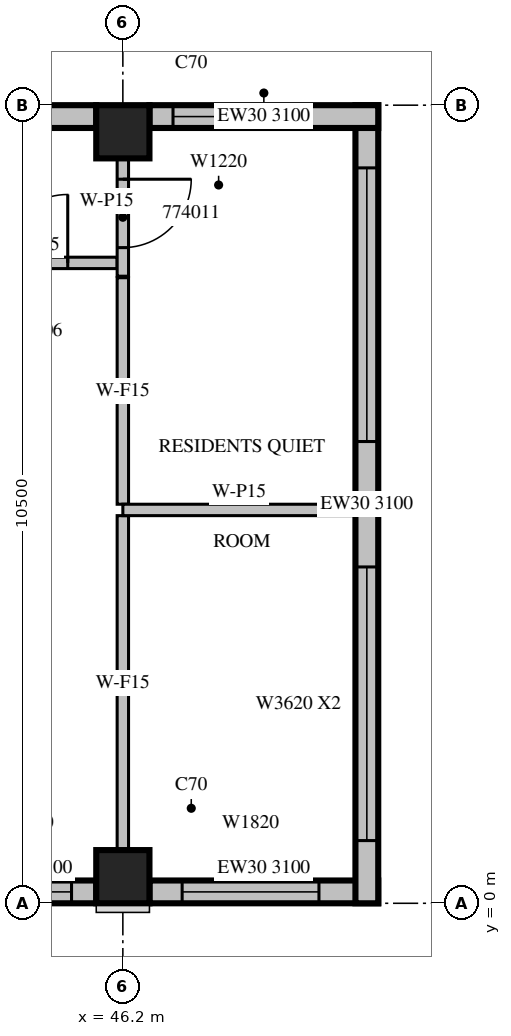
"""IFC4 building model, lengths in metres.
Left out: names, types, materials, properties, quantities, classifications, styles, units other than length and angle.
Written with IfcOpenShell. Run it as: python <this file> out.ifc"""

import sys

from ifc_helpers import new_model, si_unit, direction, frame, frame_2d, origin, origin_2d, place, context, subcontext, project, spatial, rectangle, extrude, source, transform, mapped, element, fill, save


model = new_model("IFC4")
c1 = context("Model", 3, precision=1e-05, world=origin(), true_north=direction((0.0, 1.0)))
c2 = subcontext(c1, "Body", "Model", "MODEL_VIEW")
j1 = project(units=[si_unit("LENGTHUNIT", "METRE"), si_unit("PLANEANGLEUNIT", "RADIAN")], contexts=[c1])
p1 = place(None, origin())
s1 = spatial("IfcSite", under=j1, at=p1, CompositionType="ELEMENT")
p2 = place(p1, origin())
s2 = spatial("IfcBuilding", under=s1, at=p2, CompositionType="ELEMENT")
p3 = place(p2, frame((0.0, 0.0, 319.5)))
s3 = spatial("IfcBuildingStorey", under=s2, at=p3, CompositionType="ELEMENT", Elevation=319.5)
m1 = source(origin(), c2, "Body", "SweptSolid", [
    extrude(rectangle(XDim=0.7, YDim=0.7, at=origin_2d()), origin(), (0.0, 0.0, 1.0), 3.5),
])
for number, where, z_axis, x_axis in (
    (1, (46.2, 0.35, 0.0), (0.0, 0.0, 1.0), (1.0, 0.0, 0.0)),
    (2, (46.2, 10.15, 0.0), (0.0, 0.0, 1.0), (1.0, 0.0, 0.0)),
):
    element("IfcColumn", number, at=place(p3, frame(where, z_axis=z_axis, x_axis=x_axis)), inside=s3, PredefinedType="COLUMN", context=c2, shape_type="MappedRepresentation", body=[
        mapped(m1, transform((0.0, 0.0, 0.0), scale=1.0)),
    ])
m2 = source(origin(), c2, "Body", "SweptSolid", [
    extrude(rectangle(XDim=1.85, YDim=0.3, at=frame_2d((0.925, 0.0))), origin(), (0.0, 0.0, 1.0), 3.1),
])
p4 = place(p3, frame((44.0, 0.15, 0.0), z_axis=(0.0, 0.0, 1.0), x_axis=(1.0, 0.0, 0.0)))
e3 = element("IfcWall", 3, at=p4, inside=s3, PredefinedType="STANDARD", context=c2, shape_type="MappedRepresentation", body=[
    mapped(m2, transform((0.0, 0.0, 0.0), scale=1.0)),
])
m3 = source(origin(), c2, "Body", "SweptSolid", [
    extrude(rectangle(XDim=1.2, YDim=2.0, at=frame_2d((0.6, 1.0))), frame((0.0, 0.16, 0.0), z_axis=(0.0, -1.0, 0.0), x_axis=(1.0, 0.0, 0.0)), (0.0, 0.0, 1.0), 0.32),
])
p5 = place(p4, frame((0.325, 0.0, 0.6)))
e4 = element("IfcOpeningElement", 4, at=p5, cuts=e3, PredefinedType="OPENING", context=c2, shape_type="MappedRepresentation", body=[
    mapped(m3, transform((0.0, 0.0, 0.0), scale=1.0)),
])
m4 = source(origin(), c2, "Body", "SweptSolid", [
    extrude(rectangle(XDim=3.01, YDim=0.3, at=frame_2d((1.505, 0.0))), origin(), (0.0, 0.0, 1.0), 3.1),
])
p6 = place(p3, frame((46.55, 0.15, 0.0), z_axis=(0.0, 0.0, 1.0), x_axis=(1.0, 0.0, 0.0)))
e5 = element("IfcWall", 5, at=p6, inside=s3, PredefinedType="STANDARD", context=c2, shape_type="MappedRepresentation", body=[
    mapped(m4, transform((0.0, 0.0, 0.0), scale=1.0)),
])
m5 = source(origin(), c2, "Body", "SweptSolid", [
    extrude(rectangle(XDim=1.8, YDim=2.0, at=frame_2d((0.9, 1.0))), frame((0.0, 0.16, 0.0), z_axis=(0.0, -1.0, 0.0), x_axis=(1.0, 0.0, 0.0)), (0.0, 0.0, 1.0), 0.32),
])
p7 = place(p6, frame((0.43, 0.0, 0.6)))
e6 = element("IfcOpeningElement", 6, at=p7, cuts=e5, PredefinedType="OPENING", context=c2, shape_type="MappedRepresentation", body=[
    mapped(m5, transform((0.0, 0.0, 0.0), scale=1.0)),
])
m6 = source(origin(), c2, "Body", "SweptSolid", [
    extrude(rectangle(XDim=10.5, YDim=0.3, at=frame_2d((5.25, 0.0))), origin(), (0.0, 0.0, 1.0), 3.1),
])
p8 = place(p3, frame((49.41, 0.0, 0.0), z_axis=(0.0, 0.0, 1.0), x_axis=(0.0, 1.0, 0.0)))
e7 = element("IfcWall", 7, at=p8, inside=s3, PredefinedType="STANDARD", context=c2, shape_type="MappedRepresentation", body=[
    mapped(m6, transform((0.0, 0.0, 0.0), scale=1.0)),
])
m7 = source(origin(), c2, "Body", "SweptSolid", [
    extrude(rectangle(XDim=3.6, YDim=2.0, at=frame_2d((1.8, 1.0))), frame((0.0, 0.16, 0.0), z_axis=(0.0, -1.0, 0.0), x_axis=(1.0, 0.0, 0.0)), (0.0, 0.0, 1.0), 0.32),
])
p9 = place(p8, frame((0.825, 0.0, 0.6)))
e8 = element("IfcOpeningElement", 8, at=p9, cuts=e7, PredefinedType="OPENING", context=c2, shape_type="MappedRepresentation", body=[
    mapped(m7, transform((0.0, 0.0, 0.0), scale=1.0)),
])
p10 = place(p8, frame((6.075, 0.0, 0.6)))
e9 = element("IfcOpeningElement", 9, at=p10, cuts=e7, PredefinedType="OPENING", context=c2, shape_type="MappedRepresentation", body=[
    mapped(m7, transform((0.0, 0.0, 0.0), scale=1.0)),
])
p11 = place(p3, frame((49.56, 10.35, 0.0), z_axis=(0.0, 0.0, 1.0), x_axis=(-1.0, 0.0, 0.0)))
e10 = element("IfcWall", 10, at=p11, inside=s3, PredefinedType="STANDARD", context=c2, shape_type="MappedRepresentation", body=[
    mapped(m4, transform((0.0, 0.0, 0.0), scale=1.0)),
])
p12 = place(p11, frame((1.5, 0.0, 0.6)))
e11 = element("IfcOpeningElement", 11, at=p12, cuts=e10, PredefinedType="OPENING", context=c2, shape_type="MappedRepresentation", body=[
    mapped(m3, transform((0.0, 0.0, 0.0), scale=1.0)),
])
m8 = source(origin(), c2, "Body", "SweptSolid", [
    extrude(rectangle(XDim=7.7, YDim=0.3, at=frame_2d((3.85, 0.0))), origin(), (0.0, 0.0, 1.0), 3.1),
])
p13 = place(p3, frame((45.85, 10.35, 0.0), z_axis=(0.0, 0.0, 1.0), x_axis=(-1.0, 0.0, 0.0)))
e12 = element("IfcWall", 12, at=p13, inside=s3, PredefinedType="STANDARD", context=c2, shape_type="MappedRepresentation", body=[
    mapped(m8, transform((0.0, 0.0, 0.0), scale=1.0)),
])
m9 = source(origin(), c2, "Body", "SweptSolid", [
    extrude(rectangle(XDim=3.0, YDim=2.0, at=frame_2d((1.5, 1.0))), frame((0.0, 0.16, 0.0), z_axis=(0.0, -1.0, 0.0), x_axis=(1.0, 0.0, 0.0)), (0.0, 0.0, 1.0), 0.32),
])
p14 = place(p13, frame((1.09, 0.0, 0.6)))
e13 = element("IfcOpeningElement", 13, at=p14, cuts=e12, PredefinedType="OPENING", context=c2, shape_type="MappedRepresentation", body=[
    mapped(m9, transform((0.0, 0.0, 0.0), scale=1.0)),
])
p15 = place(p13, frame((6.19, 0.0, 0.6)))
e14 = element("IfcOpeningElement", 14, at=p15, cuts=e12, PredefinedType="OPENING", context=c2, shape_type="MappedRepresentation", body=[
    mapped(m3, transform((0.0, 0.0, 0.0), scale=1.0)),
])
m10 = source(origin(), c2, "Body", "SweptSolid", [
    extrude(rectangle(XDim=2.2, YDim=0.15, at=frame_2d((1.1, 0.0))), origin(), (0.0, 0.0, 1.0), 3.1),
])
p16 = place(p3, frame((46.125, 8.425, 0.0), z_axis=(0.0, 0.0, 1.0), x_axis=(-1.0, 0.0, 0.0)))
e15 = element("IfcWall", 15, at=p16, inside=s3, PredefinedType="PARTITIONING", context=c2, shape_type="MappedRepresentation", body=[
    mapped(m10, transform((0.0, 0.0, 0.0), scale=1.0)),
])
m11 = source(origin(), c2, "Body", "SweptSolid", [
    extrude(rectangle(XDim=0.9, YDim=2.1, at=frame_2d((0.45, 1.05))), frame((0.0, 0.085, 0.0), z_axis=(0.0, -1.0, 0.0), x_axis=(1.0, 0.0, 0.0)), (0.0, 0.0, 1.0), 0.17),
])
p17 = place(p16, frame((0.65, 0.0, 0.0)))
e16 = element("IfcOpeningElement", 16, at=p17, cuts=e15, PredefinedType="OPENING", context=c2, shape_type="MappedRepresentation", body=[
    mapped(m11, transform((0.0, 0.0, 0.0), scale=1.0)),
])
m12 = source(origin(), c2, "Body", "SweptSolid", [
    extrude(rectangle(XDim=1.551, YDim=0.15, at=frame_2d((0.775, 0.0))), origin(), (0.0, 0.0, 1.0), 3.1),
])
p18 = place(p3, frame((46.2, 9.801, 0.0), z_axis=(0.0, 0.0, 1.0), x_axis=(0.0, -1.0, 0.0)))
e17 = element("IfcWall", 17, at=p18, inside=s3, PredefinedType="PARTITIONING", context=c2, shape_type="MappedRepresentation", body=[
    mapped(m12, transform((0.0, 0.0, 0.0), scale=1.0)),
])
p19 = place(p18, frame((0.275, 0.0, 0.0)))
e18 = element("IfcOpeningElement", 18, at=p19, cuts=e17, PredefinedType="OPENING", context=c2, shape_type="MappedRepresentation", body=[
    mapped(m11, transform((0.0, 0.0, 0.0), scale=1.0)),
])
m13 = source(origin(), c2, "Body", "SweptSolid", [
    extrude(rectangle(XDim=4.401, YDim=0.15, at=frame_2d((2.2, 0.0))), origin(), (0.0, 0.0, 1.0), 3.1),
])
p20 = place(p3, frame((46.2, 0.699, 0.0), z_axis=(0.0, 0.0, 1.0), x_axis=(0.0, 1.0, 0.0)))
e19 = element("IfcWall", 19, at=p20, inside=s3, PredefinedType="PARTITIONING", context=c2, shape_type="MappedRepresentation", body=[
    mapped(m13, transform((0.0, 0.0, 0.0), scale=1.0)),
])
m14 = source(origin(), c2, "Body", "SweptSolid", [
    extrude(rectangle(XDim=2.98, YDim=0.15, at=frame_2d((1.49, 0.0))), origin(), (0.0, 0.0, 1.0), 3.1),
])
p21 = place(p3, frame((46.2, 5.25, 0.0), z_axis=(0.0, 0.0, 1.0), x_axis=(0.0, 1.0, 0.0)))
e20 = element("IfcWall", 20, at=p21, inside=s3, PredefinedType="PARTITIONING", context=c2, shape_type="MappedRepresentation", body=[
    mapped(m14, transform((0.0, 0.0, 0.0), scale=1.0)),
])
m15 = source(origin(), c2, "Body", "SweptSolid", [
    extrude(rectangle(XDim=3.06, YDim=0.15, at=frame_2d((1.53, 0.0))), origin(), (0.0, 0.0, 1.0), 3.1),
])
p22 = place(p3, frame((49.26, 5.175, 0.0), z_axis=(0.0, 0.0, 1.0), x_axis=(-1.0, 0.0, 0.0)))
e21 = element("IfcWall", 21, at=p22, inside=s3, PredefinedType="PARTITIONING", context=c2, shape_type="MappedRepresentation", body=[
    mapped(m15, transform((0.0, 0.0, 0.0), scale=1.0)),
])
m16 = source(origin(), c2, "Body", "SweptSolid", [
    extrude(rectangle(XDim=1.2, YDim=2.0, at=frame_2d((0.6, 1.0))), frame((0.0, 0.03, 0.0), z_axis=(0.0, -1.0, 0.0), x_axis=(1.0, 0.0, 0.0)), (0.0, 0.0, 1.0), 0.06),
])
p23 = place(p5, origin())
e22 = element("IfcWindow", 22, at=p23, inside=s3, PartitioningType="SINGLE_PANEL", PredefinedType="WINDOW", context=c2, shape_type="MappedRepresentation", body=[
    mapped(m16, transform((0.0, 0.0, 0.0), scale=1.0)),
])
fill(e4, e22)
m17 = source(origin(), c2, "Body", "SweptSolid", [
    extrude(rectangle(XDim=1.8, YDim=2.0, at=frame_2d((0.9, 1.0))), frame((0.0, 0.03, 0.0), z_axis=(0.0, -1.0, 0.0), x_axis=(1.0, 0.0, 0.0)), (0.0, 0.0, 1.0), 0.06),
])
p24 = place(p7, origin())
e23 = element("IfcWindow", 23, at=p24, inside=s3, PartitioningType="SINGLE_PANEL", PredefinedType="WINDOW", context=c2, shape_type="MappedRepresentation", body=[
    mapped(m17, transform((0.0, 0.0, 0.0), scale=1.0)),
])
fill(e6, e23)
m18 = source(origin(), c2, "Body", "SweptSolid", [
    extrude(rectangle(XDim=3.6, YDim=2.0, at=frame_2d((1.8, 1.0))), frame((0.0, 0.03, 0.0), z_axis=(0.0, -1.0, 0.0), x_axis=(1.0, 0.0, 0.0)), (0.0, 0.0, 1.0), 0.06),
])
p25 = place(p9, origin())
e24 = element("IfcWindow", 24, at=p25, inside=s3, PartitioningType="SINGLE_PANEL", PredefinedType="WINDOW", context=c2, shape_type="MappedRepresentation", body=[
    mapped(m18, transform((0.0, 0.0, 0.0), scale=1.0)),
])
fill(e8, e24)
p26 = place(p10, origin())
e25 = element("IfcWindow", 25, at=p26, inside=s3, PartitioningType="SINGLE_PANEL", PredefinedType="WINDOW", context=c2, shape_type="MappedRepresentation", body=[
    mapped(m18, transform((0.0, 0.0, 0.0), scale=1.0)),
])
fill(e9, e25)
p27 = place(p12, origin())
e26 = element("IfcWindow", 26, at=p27, inside=s3, PartitioningType="SINGLE_PANEL", PredefinedType="WINDOW", context=c2, shape_type="MappedRepresentation", body=[
    mapped(m16, transform((0.0, 0.0, 0.0), scale=1.0)),
])
fill(e11, e26)
m19 = source(origin(), c2, "Body", "SweptSolid", [
    extrude(rectangle(XDim=0.9, YDim=2.1, at=frame_2d((0.45, 1.05))), frame((0.0, 0.025, 0.0), z_axis=(0.0, -1.0, 0.0), x_axis=(1.0, 0.0, 0.0)), (0.0, 0.0, 1.0), 0.05),
])
p28 = place(p17, origin())
e27 = element("IfcDoor", 27, at=p28, inside=s3, OperationType="SINGLE_SWING_RIGHT", PredefinedType="DOOR", context=c2, shape_type="MappedRepresentation", body=[
    mapped(m19, transform((0.0, 0.0, 0.0), scale=1.0)),
])
fill(e16, e27)
p29 = place(p19, origin())
e28 = element("IfcDoor", 28, at=p29, inside=s3, OperationType="SINGLE_SWING_LEFT", PredefinedType="DOOR", context=c2, shape_type="MappedRepresentation", body=[
    mapped(m19, transform((0.0, 0.0, 0.0), scale=1.0)),
])
fill(e18, e28)
save(model, sys.argv[1])
